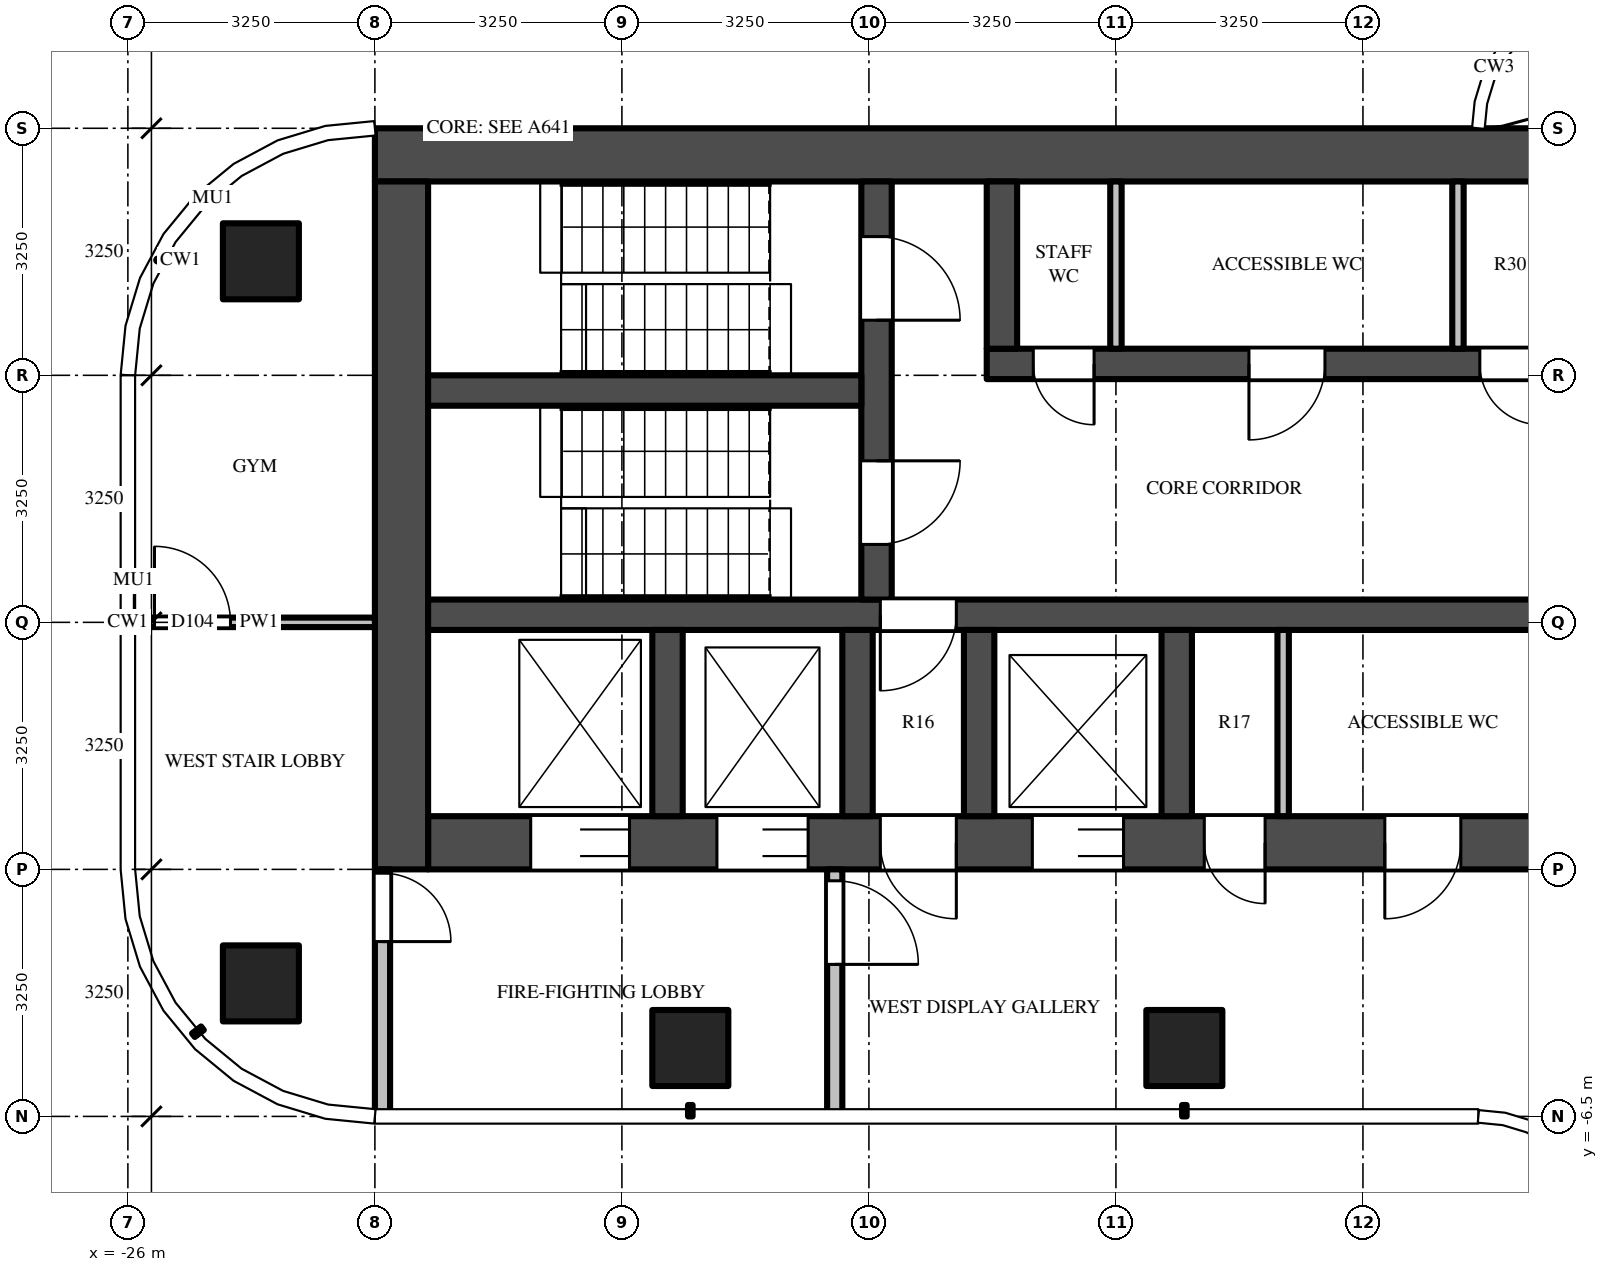
"""IFC4 building model, lengths in metres.
Left out: names, types, materials, properties, quantities, classifications, styles, units other than length and angle.
Written with IfcOpenShell. Run it as: python <this file> out.ifc"""

import sys

from ifc_helpers import new_model, si_unit, direction, frame, frame_2d, origin, origin_2d, place, context, subcontext, project, spatial, rectangle, extrude, source, transform, mapped, element, fill, save


model = new_model("IFC4")
c1 = context("Model", 3, precision=1e-05, world=origin(), true_north=direction((0.0, 1.0)))
c2 = subcontext(c1, "Body", "Model", "MODEL_VIEW")
j1 = project(units=[si_unit("LENGTHUNIT", "METRE"), si_unit("PLANEANGLEUNIT", "RADIAN")], contexts=[c1])
p1 = place(None, origin())
s1 = spatial("IfcSite", under=j1, at=p1, CompositionType="ELEMENT")
p2 = place(p1, origin())
s2 = spatial("IfcBuilding", under=s1, at=p2, CompositionType="ELEMENT")
p3 = place(p2, frame((0.0, 0.0, 314.5)))
s3 = spatial("IfcBuildingStorey", under=s2, at=p3, CompositionType="ELEMENT", Elevation=314.5)
m1 = source(origin(), c2, "Body", "SweptSolid", [
    extrude(rectangle(XDim=1.0, YDim=1.0, at=origin_2d()), origin(), (0.0, 0.0, 1.0), 3.9),
])
for number, where, z_axis, x_axis in (
    (1, (-12.1, -5.6, 0.0), (0.0, 0.0, 1.0), (1.0, 0.0, 0.0)),
    (2, (-18.6, -5.6, 0.0), (0.0, 0.0, 1.0), (1.0, 0.0, 0.0)),
    (3, (-24.25, -4.75, 0.0), (0.0, 0.0, 1.0), (1.0, 0.0, 0.0)),
    (4, (-24.25, 4.75, 0.0), (0.0, 0.0, 1.0), (1.0, 0.0, 0.0)),
):
    element("IfcColumn", number, at=place(p3, frame(where, z_axis=z_axis, x_axis=x_axis)), inside=s3, PredefinedType="COLUMN", context=c2, shape_type="MappedRepresentation", body=[
        mapped(m1, transform((0.0, 0.0, 0.0))),
    ])
m2 = source(origin(), c2, "Body", "SweptSolid", [
    extrude(rectangle(XDim=16.65, YDim=0.7, at=frame_2d((8.325, 0.0))), origin(), (0.0, 0.0, 1.0), 3.7),
])
p4 = place(p3, frame((-6.1, 6.15, 0.0), z_axis=(0.0, 0.0, 1.0), x_axis=(-1.0, 0.0, 0.0)))
e5 = element("IfcWall", 5, at=p4, inside=s3, PredefinedType="SHEAR", context=c2, shape_type="MappedRepresentation", body=[
    mapped(m2, transform((0.0, 0.0, 0.0))),
])
m3 = source(origin(), c2, "Body", "SweptSolid", [
    extrude(rectangle(XDim=14.85, YDim=0.7, at=frame_2d((7.425, 0.0))), origin(), (0.0, 0.0, 1.0), 3.7),
])
p5 = place(p3, frame((-7.2, -2.9, 0.0), z_axis=(0.0, 0.0, 1.0), x_axis=(-1.0, 0.0, 0.0)))
e6 = element("IfcWall", 6, at=p5, inside=s3, PredefinedType="SHEAR", context=c2, shape_type="MappedRepresentation", body=[
    mapped(m3, transform((0.0, 0.0, 0.0))),
])
m4 = source(origin(), c2, "Body", "SweptSolid", [
    extrude(rectangle(XDim=1.2, YDim=2.1, at=frame_2d((0.6, 1.05))), frame((0.0, 0.36, 0.0), z_axis=(0.0, -1.0, 0.0), x_axis=(1.0, 0.0, 0.0)), (0.0, 0.0, 1.0), 0.72),
])
p6 = place(p5, frame((5.7, 0.0, 0.0)))
e7 = element("IfcOpeningElement", 7, at=p6, cuts=e6, PredefinedType="OPENING", context=c2, shape_type="MappedRepresentation", body=[
    mapped(m4, transform((0.0, 0.0, 0.0))),
])
m5 = source(origin(), c2, "Body", "SweptSolid", [
    extrude(rectangle(XDim=1.3, YDim=2.1, at=frame_2d((0.65, 1.05))), frame((0.0, 0.36, 0.0), z_axis=(0.0, -1.0, 0.0), x_axis=(1.0, 0.0, 0.0)), (0.0, 0.0, 1.0), 0.72),
])
p7 = place(p5, frame((12.2, 0.0, 0.0)))
e8 = element("IfcOpeningElement", 8, at=p7, cuts=e6, PredefinedType="OPENING", context=c2, shape_type="MappedRepresentation", body=[
    mapped(m5, transform((0.0, 0.0, 0.0))),
])
p8 = place(p5, frame((9.85, 0.0, 0.0)))
e9 = element("IfcOpeningElement", 9, at=p8, cuts=e6, PredefinedType="OPENING", context=c2, shape_type="MappedRepresentation", body=[
    mapped(m4, transform((0.0, 0.0, 0.0))),
])
m6 = source(origin(), c2, "Body", "SweptSolid", [
    extrude(rectangle(XDim=1.0, YDim=2.1, at=frame_2d((0.5, 1.05))), frame((0.0, 0.36, 0.0), z_axis=(0.0, -1.0, 0.0), x_axis=(1.0, 0.0, 0.0)), (0.0, 0.0, 1.0), 0.72),
])
p9 = place(p5, frame((7.9, 0.0, 0.0)))
e10 = element("IfcOpeningElement", 10, at=p9, cuts=e6, PredefinedType="OPENING", context=c2, shape_type="MappedRepresentation", body=[
    mapped(m6, transform((0.0, 0.0, 0.0))),
])
p10 = place(p5, frame((1.262, 0.0, 0.0)))
e11 = element("IfcOpeningElement", 11, at=p10, cuts=e6, PredefinedType="OPENING", context=c2, shape_type="MappedRepresentation", body=[
    mapped(m6, transform((0.0, 0.0, 0.0))),
])
m7 = source(origin(), c2, "Body", "SweptSolid", [
    extrude(rectangle(XDim=0.8, YDim=2.1, at=frame_2d((0.4, 1.05))), frame((0.0, 0.36, 0.0), z_axis=(0.0, -1.0, 0.0), x_axis=(1.0, 0.0, 0.0)), (0.0, 0.0, 1.0), 0.72),
])
p11 = place(p5, frame((3.837, 0.0, 0.0)))
e12 = element("IfcOpeningElement", 12, at=p11, cuts=e6, PredefinedType="OPENING", context=c2, shape_type="MappedRepresentation", body=[
    mapped(m7, transform((0.0, 0.0, 0.0))),
])
m8 = source(origin(), c2, "Body", "SweptSolid", [
    extrude(rectangle(XDim=9.05, YDim=0.7, at=frame_2d((4.525, 0.0))), origin(), (0.0, 0.0, 1.0), 3.7),
])
p12 = place(p3, frame((-22.4, 5.8, 0.0), z_axis=(0.0, 0.0, 1.0), x_axis=(0.0, -1.0, 0.0)))
e13 = element("IfcWall", 13, at=p12, inside=s3, PredefinedType="SHEAR", context=c2, shape_type="MappedRepresentation", body=[
    mapped(m8, transform((0.0, 0.0, 0.0))),
])
m9 = source(origin(), c2, "Body", "SweptSolid", [
    extrude(rectangle(XDim=7.5, YDim=0.4, at=frame_2d((3.75, 0.0))), origin(), (0.0, 0.0, 1.0), 3.7),
])
p13 = place(p3, frame((-7.2, 3.4, 0.0), z_axis=(0.0, 0.0, 1.0), x_axis=(-1.0, 0.0, 0.0)))
e14 = element("IfcWall", 14, at=p13, inside=s3, PredefinedType="SHEAR", context=c2, shape_type="MappedRepresentation", body=[
    mapped(m9, transform((0.0, 0.0, 0.0))),
])
m10 = source(origin(), c2, "Body", "SweptSolid", [
    extrude(rectangle(XDim=0.8, YDim=2.1, at=frame_2d((0.4, 1.05))), frame((0.0, 0.21, 0.0), z_axis=(0.0, -1.0, 0.0), x_axis=(1.0, 0.0, 0.0)), (0.0, 0.0, 1.0), 0.42),
])
p14 = place(p13, frame((0.212, 0.0, 0.0)))
e15 = element("IfcOpeningElement", 15, at=p14, cuts=e14, PredefinedType="OPENING", context=c2, shape_type="MappedRepresentation", body=[
    mapped(m10, transform((0.0, 0.0, 0.0))),
])
m11 = source(origin(), c2, "Body", "SweptSolid", [
    extrude(rectangle(XDim=1.0, YDim=2.1, at=frame_2d((0.5, 1.05))), frame((0.0, 0.21, 0.0), z_axis=(0.0, -1.0, 0.0), x_axis=(1.0, 0.0, 0.0)), (0.0, 0.0, 1.0), 0.42),
])
p15 = place(p13, frame((3.05, 0.0, 0.0)))
e16 = element("IfcOpeningElement", 16, at=p15, cuts=e14, PredefinedType="OPENING", context=c2, shape_type="MappedRepresentation", body=[
    mapped(m11, transform((0.0, 0.0, 0.0))),
])
p16 = place(p13, frame((6.087, 0.0, 0.0)))
e17 = element("IfcOpeningElement", 17, at=p16, cuts=e14, PredefinedType="OPENING", context=c2, shape_type="MappedRepresentation", body=[
    mapped(m10, transform((0.0, 0.0, 0.0))),
])
m12 = source(origin(), c2, "Body", "SweptSolid", [
    extrude(rectangle(XDim=14.85, YDim=0.4, at=frame_2d((7.425, 0.0))), origin(), (0.0, 0.0, 1.0), 3.7),
])
p17 = place(p3, frame((-7.2, 0.1, 0.0), z_axis=(0.0, 0.0, 1.0), x_axis=(-1.0, 0.0, 0.0)))
e18 = element("IfcWall", 18, at=p17, inside=s3, PredefinedType="SHEAR", context=c2, shape_type="MappedRepresentation", body=[
    mapped(m12, transform((0.0, 0.0, 0.0))),
])
p18 = place(p17, frame((7.9, 0.0, 0.0)))
e19 = element("IfcOpeningElement", 19, at=p18, cuts=e18, PredefinedType="OPENING", context=c2, shape_type="MappedRepresentation", body=[
    mapped(m11, transform((0.0, 0.0, 0.0))),
])
m13 = source(origin(), c2, "Body", "SweptSolid", [
    extrude(rectangle(XDim=5.5, YDim=0.4, at=frame_2d((2.75, 0.0))), origin(), (0.0, 0.0, 1.0), 3.7),
])
p19 = place(p3, frame((-16.15, 5.8, 0.0), z_axis=(0.0, 0.0, 1.0), x_axis=(0.0, -1.0, 0.0)))
e20 = element("IfcWall", 20, at=p19, inside=s3, PredefinedType="SHEAR", context=c2, shape_type="MappedRepresentation", body=[
    mapped(m13, transform((0.0, 0.0, 0.0))),
])
m14 = source(origin(), c2, "Body", "SweptSolid", [
    extrude(rectangle(XDim=1.1, YDim=2.1, at=frame_2d((0.55, 1.05))), frame((0.0, 0.21, 0.0), z_axis=(0.0, -1.0, 0.0), x_axis=(1.0, 0.0, 0.0)), (0.0, 0.0, 1.0), 0.42),
])
p20 = place(p19, frame((0.725, 0.0, 0.0)))
e21 = element("IfcOpeningElement", 21, at=p20, cuts=e20, PredefinedType="OPENING", context=c2, shape_type="MappedRepresentation", body=[
    mapped(m14, transform((0.0, 0.0, 0.0))),
])
p21 = place(p19, frame((3.675, 0.0, 0.0)))
e22 = element("IfcOpeningElement", 22, at=p21, cuts=e20, PredefinedType="OPENING", context=c2, shape_type="MappedRepresentation", body=[
    mapped(m14, transform((0.0, 0.0, 0.0))),
])
m15 = source(origin(), c2, "Body", "SweptSolid", [
    extrude(rectangle(XDim=5.7, YDim=0.4, at=frame_2d((2.85, 0.0))), origin(), (0.0, 0.0, 1.0), 3.7),
])
p22 = place(p3, frame((-16.35, 3.05, 0.0), z_axis=(0.0, 0.0, 1.0), x_axis=(-1.0, 0.0, 0.0)))
e23 = element("IfcWall", 23, at=p22, inside=s3, PredefinedType="SHEAR", context=c2, shape_type="MappedRepresentation", body=[
    mapped(m15, transform((0.0, 0.0, 0.0))),
])
m16 = source(origin(), c2, "Body", "SweptSolid", [
    extrude(rectangle(XDim=2.2, YDim=0.4, at=frame_2d((1.1, 0.0))), origin(), (0.0, 0.0, 1.0), 3.7),
])
p23 = place(p3, frame((-14.5, 5.8, 0.0), z_axis=(0.0, 0.0, 1.0), x_axis=(0.0, -1.0, 0.0)))
e24 = element("IfcWall", 24, at=p23, inside=s3, PredefinedType="SHEAR", context=c2, shape_type="MappedRepresentation", body=[
    mapped(m16, transform((0.0, 0.0, 0.0))),
])
m17 = source(origin(), c2, "Body", "SweptSolid", [
    extrude(rectangle(XDim=2.45, YDim=0.4, at=frame_2d((1.225, 0.0))), origin(), (0.0, 0.0, 1.0), 3.7),
])
for number, where, z_axis, x_axis in (
    (25, (-12.2, -0.1, 0.0), (0.0, 0.0, 1.0), (0.0, -1.0, 0.0)),
    (26, (-14.8, -0.1, 0.0), (0.0, 0.0, 1.0), (0.0, -1.0, 0.0)),
    (27, (-16.4, -0.1, 0.0), (0.0, 0.0, 1.0), (0.0, -1.0, 0.0)),
    (28, (-18.9, -0.1, 0.0), (0.0, 0.0, 1.0), (0.0, -1.0, 0.0)),
):
    element("IfcWall", number, at=place(p3, frame(where, z_axis=z_axis, x_axis=x_axis)), inside=s3, PredefinedType="SHEAR", context=c2, shape_type="MappedRepresentation", body=[
        mapped(m17, transform((0.0, 0.0, 0.0))),
    ])
m18 = source(origin(), c2, "Body", "SweptSolid", [
    extrude(rectangle(XDim=3.25, YDim=0.2, at=frame_2d((1.625, 0.0))), origin(), (0.0, 0.0, 1.0), 3.7),
])
p24 = place(p3, frame((-16.7, -3.25, 0.0), z_axis=(0.0, 0.0, 1.0), x_axis=(0.0, -1.0, 0.0)))
e29 = element("IfcWall", 29, at=p24, inside=s3, PredefinedType="PARTITIONING", context=c2, shape_type="MappedRepresentation", body=[
    mapped(m18, transform((0.0, 0.0, 0.0))),
])
m19 = source(origin(), c2, "Body", "SweptSolid", [
    extrude(rectangle(XDim=1.1, YDim=2.1, at=frame_2d((0.55, 1.05))), frame((0.0, 0.11, 0.0), z_axis=(0.0, -1.0, 0.0), x_axis=(1.0, 0.0, 0.0)), (0.0, 0.0, 1.0), 0.22),
])
p25 = place(p24, frame((0.15, 0.0, 0.0)))
e30 = element("IfcOpeningElement", 30, at=p25, cuts=e29, PredefinedType="OPENING", context=c2, shape_type="MappedRepresentation", body=[
    mapped(m19, transform((0.0, 0.0, 0.0))),
])
p26 = place(p3, frame((-22.65, -3.25, 0.0), z_axis=(0.0, 0.0, 1.0), x_axis=(0.0, -1.0, 0.0)))
e31 = element("IfcWall", 31, at=p26, inside=s3, PredefinedType="PARTITIONING", context=c2, shape_type="MappedRepresentation", body=[
    mapped(m18, transform((0.0, 0.0, 0.0))),
])
m20 = source(origin(), c2, "Body", "SweptSolid", [
    extrude(rectangle(XDim=0.9, YDim=2.1, at=frame_2d((0.45, 1.05))), frame((0.0, 0.11, 0.0), z_axis=(0.0, -1.0, 0.0), x_axis=(1.0, 0.0, 0.0)), (0.0, 0.0, 1.0), 0.22),
])
p27 = place(p26, frame((0.05, 0.0, 0.0)))
e32 = element("IfcOpeningElement", 32, at=p27, cuts=e31, PredefinedType="OPENING", context=c2, shape_type="MappedRepresentation", body=[
    mapped(m20, transform((0.0, 0.0, 0.0))),
])
m21 = source(origin(), c2, "Body", "SweptSolid", [
    extrude(rectangle(XDim=2.2, YDim=0.15, at=frame_2d((1.1, 0.0))), origin(), (0.0, 0.0, 1.0), 3.7),
])
for number, where, z_axis, x_axis in (
    (33, (-8.5, 5.8, 0.0), (0.0, 0.0, 1.0), (0.0, -1.0, 0.0)),
    (34, (-13.0, 5.8, 0.0), (0.0, 0.0, 1.0), (0.0, -1.0, 0.0)),
):
    element("IfcWall", number, at=place(p3, frame(where, z_axis=z_axis, x_axis=x_axis)), inside=s3, PredefinedType="PARTITIONING", context=c2, shape_type="MappedRepresentation", body=[
        mapped(m21, transform((0.0, 0.0, 0.0))),
    ])
m22 = source(origin(), c2, "Body", "SweptSolid", [
    extrude(rectangle(XDim=2.45, YDim=0.15, at=frame_2d((1.225, 0.0))), origin(), (0.0, 0.0, 1.0), 3.7),
])
p28 = place(p3, frame((-10.8, -0.1, 0.0), z_axis=(0.0, 0.0, 1.0), x_axis=(0.0, -1.0, 0.0)))
e35 = element("IfcWall", 35, at=p28, inside=s3, PredefinedType="PARTITIONING", context=c2, shape_type="MappedRepresentation", body=[
    mapped(m22, transform((0.0, 0.0, 0.0))),
])
m23 = source(origin(), c2, "Body", "SweptSolid", [
    extrude(rectangle(XDim=3.05, YDim=0.125, at=frame_2d((1.525, 0.0))), origin(), (0.0, 0.0, 1.0), 2.78),
])
p29 = place(p3, frame((-25.8, 0.0, 0.0), z_axis=(0.0, 0.0, 1.0), x_axis=(1.0, 0.0, 0.0)))
e36 = element("IfcWall", 36, at=p29, inside=s3, PredefinedType="PARTITIONING", context=c2, shape_type="MappedRepresentation", body=[
    mapped(m23, transform((0.0, 0.0, 0.0))),
])
m24 = source(origin(), c2, "Body", "SweptSolid", [
    extrude(rectangle(XDim=1.0, YDim=2.1, at=frame_2d((0.5, 1.05))), frame((0.0, 0.073, 0.0), z_axis=(0.0, -1.0, 0.0), x_axis=(1.0, 0.0, 0.0)), (0.0, 0.0, 1.0), 0.145),
])
p30 = place(p29, frame((0.15, 0.0, 0.0)))
e37 = element("IfcOpeningElement", 37, at=p30, cuts=e36, PredefinedType="OPENING", context=c2, shape_type="MappedRepresentation", body=[
    mapped(m24, transform((0.0, 0.0, 0.0))),
])
m25 = source(origin(), c2, "Body", "SweptSolid", [
    extrude(rectangle(XDim=1.2, YDim=2.1, at=frame_2d((0.6, 1.05))), frame((0.0, -0.275, 0.0), z_axis=(0.0, -1.0, 0.0), x_axis=(1.0, 0.0, 0.0)), (0.0, 0.0, 1.0), 0.05),
])
p31 = place(p6, origin())
e38 = element("IfcDoor", 38, at=p31, inside=s3, OperationType="DOUBLE_DOOR_SLIDING", PredefinedType="DOOR", context=c2, shape_type="MappedRepresentation", body=[
    mapped(m25, transform((0.0, 0.0, 0.0))),
])
fill(e7, e38)
m26 = source(origin(), c2, "Body", "SweptSolid", [
    extrude(rectangle(XDim=1.3, YDim=2.1, at=frame_2d((0.65, 1.05))), frame((0.0, -0.275, 0.0), z_axis=(0.0, -1.0, 0.0), x_axis=(1.0, 0.0, 0.0)), (0.0, 0.0, 1.0), 0.05),
])
p32 = place(p7, origin())
e39 = element("IfcDoor", 39, at=p32, inside=s3, OperationType="DOUBLE_DOOR_SLIDING", PredefinedType="DOOR", context=c2, shape_type="MappedRepresentation", body=[
    mapped(m26, transform((0.0, 0.0, 0.0))),
])
fill(e8, e39)
p33 = place(p8, origin())
e40 = element("IfcDoor", 40, at=p33, inside=s3, OperationType="DOUBLE_DOOR_SLIDING", PredefinedType="DOOR", context=c2, shape_type="MappedRepresentation", body=[
    mapped(m25, transform((0.0, 0.0, 0.0))),
])
fill(e9, e40)
m27 = source(origin(), c2, "Body", "SweptSolid", [
    extrude(rectangle(XDim=1.1, YDim=2.1, at=frame_2d((0.55, 1.05))), frame((0.0, 0.025, 0.0), z_axis=(0.0, -1.0, 0.0), x_axis=(1.0, 0.0, 0.0)), (0.0, 0.0, 1.0), 0.05),
])
p34 = place(p20, origin())
e41 = element("IfcDoor", 41, at=p34, inside=s3, OperationType="SINGLE_SWING_RIGHT", PredefinedType="DOOR", context=c2, shape_type="MappedRepresentation", body=[
    mapped(m27, transform((0.0, 0.0, 0.0))),
])
fill(e21, e41)
p35 = place(p21, origin())
e42 = element("IfcDoor", 42, at=p35, inside=s3, OperationType="SINGLE_SWING_LEFT", PredefinedType="DOOR", context=c2, shape_type="MappedRepresentation", body=[
    mapped(m27, transform((0.0, 0.0, 0.0))),
])
fill(e22, e42)
m28 = source(origin(), c2, "Body", "SweptSolid", [
    extrude(rectangle(XDim=1.0, YDim=2.1, at=frame_2d((0.5, 1.05))), frame((0.0, 0.025, 0.0), z_axis=(0.0, -1.0, 0.0), x_axis=(1.0, 0.0, 0.0)), (0.0, 0.0, 1.0), 0.05),
])
p36 = place(p18, origin())
e43 = element("IfcDoor", 43, at=p36, inside=s3, OperationType="SINGLE_SWING_RIGHT", PredefinedType="DOOR", context=c2, shape_type="MappedRepresentation", body=[
    mapped(m28, transform((0.0, 0.0, 0.0))),
])
fill(e19, e43)
m29 = source(origin(), c2, "Body", "SweptSolid", [
    extrude(rectangle(XDim=1.0, YDim=2.1, at=frame_2d((0.5, 1.05))), frame((0.0, -0.275, 0.0), z_axis=(0.0, -1.0, 0.0), x_axis=(1.0, 0.0, 0.0)), (0.0, 0.0, 1.0), 0.05),
])
p37 = place(p9, origin())
e44 = element("IfcDoor", 44, at=p37, inside=s3, OperationType="SINGLE_SWING_LEFT", PredefinedType="DOOR", context=c2, shape_type="MappedRepresentation", body=[
    mapped(m29, transform((0.0, 0.0, 0.0))),
])
fill(e10, e44)
p38 = place(p25, origin())
e45 = element("IfcDoor", 45, at=p38, inside=s3, OperationType="SINGLE_SWING_RIGHT", PredefinedType="DOOR", context=c2, shape_type="MappedRepresentation", body=[
    mapped(m27, transform((0.0, 0.0, 0.0))),
])
fill(e30, e45)
m30 = source(origin(), c2, "Body", "SweptSolid", [
    extrude(rectangle(XDim=0.9, YDim=2.1, at=frame_2d((0.45, 1.05))), frame((0.0, 0.025, 0.0), z_axis=(0.0, -1.0, 0.0), x_axis=(1.0, 0.0, 0.0)), (0.0, 0.0, 1.0), 0.05),
])
p39 = place(p27, origin())
e46 = element("IfcDoor", 46, at=p39, inside=s3, OperationType="SINGLE_SWING_RIGHT", PredefinedType="DOOR", context=c2, shape_type="MappedRepresentation", body=[
    mapped(m30, transform((0.0, 0.0, 0.0))),
])
fill(e32, e46)
m31 = source(origin(), c2, "Body", "SweptSolid", [
    extrude(rectangle(XDim=0.8, YDim=2.1, at=frame_2d((0.4, 1.05))), frame((0.0, 0.025, 0.0), z_axis=(0.0, -1.0, 0.0), x_axis=(1.0, 0.0, 0.0)), (0.0, 0.0, 1.0), 0.05),
])
p40 = place(p14, origin())
e47 = element("IfcDoor", 47, at=p40, inside=s3, OperationType="SINGLE_SWING_LEFT", PredefinedType="DOOR", context=c2, shape_type="MappedRepresentation", body=[
    mapped(m31, transform((0.0, 0.0, 0.0))),
])
fill(e15, e47)
p41 = place(p15, origin())
e48 = element("IfcDoor", 48, at=p41, inside=s3, OperationType="SINGLE_SWING_RIGHT", PredefinedType="DOOR", context=c2, shape_type="MappedRepresentation", body=[
    mapped(m28, transform((0.0, 0.0, 0.0))),
])
fill(e16, e48)
p42 = place(p16, origin())
e49 = element("IfcDoor", 49, at=p42, inside=s3, OperationType="SINGLE_SWING_LEFT", PredefinedType="DOOR", context=c2, shape_type="MappedRepresentation", body=[
    mapped(m31, transform((0.0, 0.0, 0.0))),
])
fill(e17, e49)
p43 = place(p10, origin())
e50 = element("IfcDoor", 50, at=p43, inside=s3, OperationType="SINGLE_SWING_RIGHT", PredefinedType="DOOR", context=c2, shape_type="MappedRepresentation", body=[
    mapped(m29, transform((0.0, 0.0, 0.0))),
])
fill(e11, e50)
m32 = source(origin(), c2, "Body", "SweptSolid", [
    extrude(rectangle(XDim=0.8, YDim=2.1, at=frame_2d((0.4, 1.05))), frame((0.0, -0.275, 0.0), z_axis=(0.0, -1.0, 0.0), x_axis=(1.0, 0.0, 0.0)), (0.0, 0.0, 1.0), 0.05),
])
p44 = place(p11, origin())
e51 = element("IfcDoor", 51, at=p44, inside=s3, OperationType="SINGLE_SWING_LEFT", PredefinedType="DOOR", context=c2, shape_type="MappedRepresentation", body=[
    mapped(m32, transform((0.0, 0.0, 0.0))),
])
fill(e12, e51)
p45 = place(p30, origin())
e52 = element("IfcDoor", 52, at=p45, inside=s3, OperationType="SINGLE_SWING_LEFT", PredefinedType="DOOR", context=c2, shape_type="MappedRepresentation", body=[
    mapped(m28, transform((0.0, 0.0, 0.0))),
])
fill(e37, e52)
save(model, sys.argv[1])
